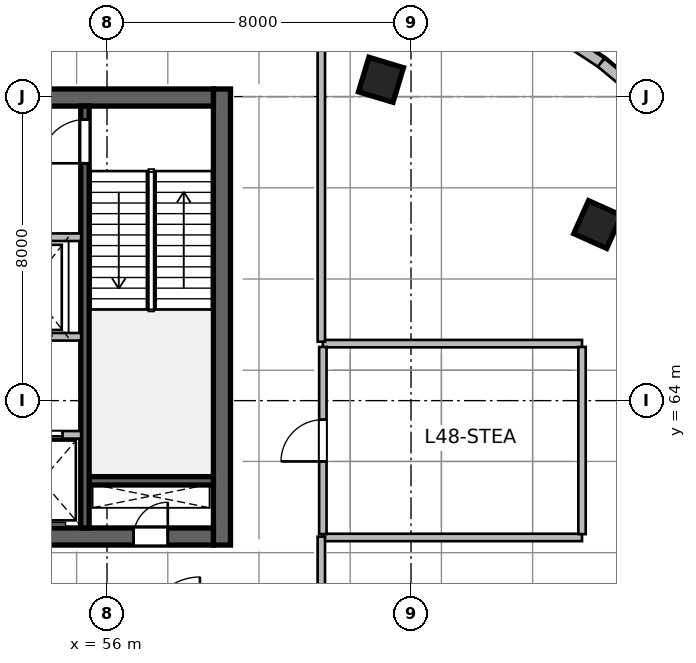
"""IFC4 building model, lengths in metres.
Left out: names, types, materials, properties, quantities, classifications, styles, units other than length and angle.
Written with IfcOpenShell. Run it as: python <this file> out.ifc"""

import sys

from ifc_helpers import new_model, si_unit, direction, frame, frame_2d, origin, origin_2d, place, context, subcontext, project, spatial, rectangle, extrude, source, transform, mapped, element, fill, save


model = new_model("IFC4")
c1 = context("Model", 3, precision=1e-05, world=origin(), true_north=direction((0.0, 1.0)))
c2 = subcontext(c1, "Body", "Model", "MODEL_VIEW")
j1 = project(units=[si_unit("LENGTHUNIT", "METRE"), si_unit("PLANEANGLEUNIT", "RADIAN")], contexts=[c1])
p1 = place(None, origin())
s1 = spatial("IfcSite", under=j1, at=p1, CompositionType="ELEMENT")
p2 = place(p1, origin())
s2 = spatial("IfcBuilding", under=s1, at=p2, CompositionType="ELEMENT")
p3 = place(p2, frame((0.0, 0.0, 199.2)))
s3 = spatial("IfcBuildingStorey", under=s2, at=p3, CompositionType="ELEMENT", Elevation=199.2)
m1 = source(origin(), c2, "Body", "SweptSolid", [
    extrude(rectangle(XDim=12.0, YDim=0.45, at=frame_2d((6.0, 0.0))), origin(), (0.0, 0.0, 1.0), 4.8),
])
p4 = place(p3, frame((59.025, 60.2, 0.0), z_axis=(0.0, 0.0, 1.0), x_axis=(0.0, 1.0, 0.0)))
e1 = element("IfcWall", 1, at=p4, inside=s3, PredefinedType="SHEAR", context=c2, shape_type="MappedRepresentation", body=[
    mapped(m1, transform((0.0, 0.0, 0.0), scale=1.0)),
])
m2 = source(origin(), c2, "Body", "SweptSolid", [
    extrude(rectangle(XDim=21.6, YDim=0.45, at=frame_2d((10.8, 0.0))), origin(), (0.0, 0.0, 1.0), 4.8),
])
p5 = place(p3, frame((37.2, 60.425, 0.0), z_axis=(0.0, 0.0, 1.0), x_axis=(1.0, 0.0, 0.0)))
e2 = element("IfcWall", 2, at=p5, inside=s3, PredefinedType="SHEAR", context=c2, shape_type="MappedRepresentation", body=[
    mapped(m2, transform((0.0, 0.0, 0.0), scale=1.0)),
])
p6 = place(p5, frame((1.1, 0.0, 0.0)))
e3 = element("IfcOpeningElement", 3, at=p6, cuts=e2, PredefinedType="OPENING", context=c2, shape_type="SweptSolid", body=[
    extrude(rectangle(XDim=1.15, YDim=2.15, at=frame_2d((0.575, 1.075))), frame((0.0, 0.235, 0.0), z_axis=(0.0, -1.0, 0.0), x_axis=(1.0, 0.0, 0.0)), (0.0, 0.0, 1.0), 0.47),
])
p7 = place(p5, frame((19.5, 0.0, 0.0)))
e4 = element("IfcOpeningElement", 4, at=p7, cuts=e2, PredefinedType="OPENING", context=c2, shape_type="SweptSolid", body=[
    extrude(rectangle(XDim=0.9, YDim=2.1, at=frame_2d((0.45, 1.05))), frame((0.0, 0.235, 0.0), z_axis=(0.0, -1.0, 0.0), x_axis=(1.0, 0.0, 0.0)), (0.0, 0.0, 1.0), 0.47),
])
p8 = place(p5, frame((12.02, 0.0, 0.0)))
e5 = element("IfcOpeningElement", 5, at=p8, cuts=e2, PredefinedType="OPENING", context=c2, shape_type="SweptSolid", body=[
    extrude(rectangle(XDim=1.6, YDim=2.15, at=frame_2d((0.8, 1.075))), frame((0.0, 0.235, 0.0), z_axis=(0.0, -1.0, 0.0), x_axis=(1.0, 0.0, 0.0)), (0.0, 0.0, 1.0), 0.47),
])
p9 = place(p3, frame((37.2, 71.975, 0.0), z_axis=(0.0, 0.0, 1.0), x_axis=(1.0, 0.0, 0.0)))
e6 = element("IfcWall", 6, at=p9, inside=s3, PredefinedType="SHEAR", context=c2, shape_type="MappedRepresentation", body=[
    mapped(m2, transform((0.0, 0.0, 0.0), scale=1.0)),
])
p10 = place(p9, frame((1.2, 0.0, 0.0)))
e7 = element("IfcOpeningElement", 7, at=p10, cuts=e6, PredefinedType="OPENING", context=c2, shape_type="SweptSolid", body=[
    extrude(rectangle(XDim=0.9, YDim=2.1, at=frame_2d((0.45, 1.05))), frame((0.0, 0.235, 0.0), z_axis=(0.0, -1.0, 0.0), x_axis=(1.0, 0.0, 0.0)), (0.0, 0.0, 1.0), 0.47),
])
p11 = place(p9, frame((14.7, 0.0, 0.0)))
e8 = element("IfcOpeningElement", 8, at=p11, cuts=e6, PredefinedType="OPENING", context=c2, shape_type="SweptSolid", body=[
    extrude(rectangle(XDim=1.2, YDim=2.15, at=frame_2d((0.6, 1.075))), frame((0.0, 0.235, 0.0), z_axis=(0.0, -1.0, 0.0), x_axis=(1.0, 0.0, 0.0)), (0.0, 0.0, 1.0), 0.47),
])
p12 = place(p9, frame((4.15, 0.0, 0.0)))
e9 = element("IfcOpeningElement", 9, at=p12, cuts=e6, PredefinedType="OPENING", context=c2, shape_type="SweptSolid", body=[
    extrude(rectangle(XDim=1.3, YDim=2.15, at=frame_2d((0.65, 1.075))), frame((0.0, 0.235, 0.0), z_axis=(0.0, -1.0, 0.0), x_axis=(1.0, 0.0, 0.0)), (0.0, 0.0, 1.0), 0.47),
])
p13 = place(p9, frame((7.25, 0.0, 0.0)))
e10 = element("IfcOpeningElement", 10, at=p13, cuts=e6, PredefinedType="OPENING", context=c2, shape_type="SweptSolid", body=[
    extrude(rectangle(XDim=0.9, YDim=2.1, at=frame_2d((0.45, 1.05))), frame((0.0, 0.235, 0.0), z_axis=(0.0, -1.0, 0.0), x_axis=(1.0, 0.0, 0.0)), (0.0, 0.0, 1.0), 0.47),
])
p14 = place(p9, frame((10.95, 0.0, 0.0)))
e11 = element("IfcOpeningElement", 11, at=p14, cuts=e6, PredefinedType="OPENING", context=c2, shape_type="SweptSolid", body=[
    extrude(rectangle(XDim=0.9, YDim=2.1, at=frame_2d((0.45, 1.05))), frame((0.0, 0.235, 0.0), z_axis=(0.0, -1.0, 0.0), x_axis=(1.0, 0.0, 0.0)), (0.0, 0.0, 1.0), 0.47),
])
m3 = source(origin(), c2, "Body", "SweptSolid", [
    extrude(rectangle(XDim=3.27, YDim=0.22, at=frame_2d((1.635, 0.0))), origin(), (0.0, 0.0, 1.0), 4.8),
])
p15 = place(p3, frame((55.53, 61.89, 0.0), z_axis=(0.0, 0.0, 1.0), x_axis=(1.0, 0.0, 0.0)))
e12 = element("IfcWall", 12, at=p15, inside=s3, PredefinedType="SHEAR", context=c2, shape_type="MappedRepresentation", body=[
    mapped(m3, transform((0.0, 0.0, 0.0), scale=1.0)),
])
m4 = source(origin(), c2, "Body", "SweptSolid", [
    extrude(rectangle(XDim=11.1, YDim=0.22, at=frame_2d((5.55, 0.0))), origin(), (0.0, 0.0, 1.0), 4.8),
])
p16 = place(p3, frame((55.42, 60.65, 0.0), z_axis=(0.0, 0.0, 1.0), x_axis=(0.0, 1.0, 0.0)))
e13 = element("IfcWall", 13, at=p16, inside=s3, PredefinedType="SHEAR", context=c2, shape_type="MappedRepresentation", body=[
    mapped(m4, transform((0.0, 0.0, 0.0), scale=1.0)),
])
p17 = place(p16, frame((9.595, 0.0, 0.0)))
e14 = element("IfcOpeningElement", 14, at=p17, cuts=e13, PredefinedType="OPENING", context=c2, shape_type="SweptSolid", body=[
    extrude(rectangle(XDim=1.15, YDim=2.15, at=frame_2d((0.575, 1.075))), frame((0.0, 0.12, 0.0), z_axis=(0.0, -1.0, 0.0), x_axis=(1.0, 0.0, 0.0)), (0.0, 0.0, 1.0), 0.24),
])
m5 = source(origin(), c2, "Body", "SweptSolid", [
    extrude(rectangle(XDim=0.95, YDim=0.95, at=origin_2d()), origin(), (0.0, 0.0, 1.0), 4.8),
])
for number, where, z_axis, x_axis in (
    (15, (63.209, 72.442, 0.0), (0.0, 0.0, 1.0), (0.289, 0.957, 0.0)),
    (16, (68.91, 68.633, 0.0), (0.0, 0.0, 1.0), (0.409, 0.912, 0.0)),
):
    element("IfcColumn", number, at=place(p3, frame(where, z_axis=z_axis, x_axis=x_axis)), inside=s3, PredefinedType="COLUMN", context=c2, shape_type="MappedRepresentation", body=[
        mapped(m5, transform((0.0, 0.0, 0.0), scale=1.0)),
    ])
m6 = source(origin(), c2, "Body", "SweptSolid", [
    extrude(rectangle(XDim=4.713, YDim=0.28, at=frame_2d((2.356, 0.0))), origin(), (0.0, 0.0, 1.0), 4.54),
])
p18 = place(p3, frame((65.066, 75.482, 0.0), z_axis=(0.0, 0.0, 1.0), x_axis=(0.835974386457, -0.548768462275, 0.0)))
e17 = element("IfcWall", 17, at=p18, inside=s3, PredefinedType="SOLIDWALL", context=c2, shape_type="MappedRepresentation", body=[
    mapped(m6, transform((0.0, 0.0, 0.0), scale=1.0)),
])
m7 = source(origin(), c2, "Body", "SweptSolid", [
    extrude(rectangle(XDim=4.852, YDim=0.28, at=frame_2d((2.426, 0.0))), origin(), (0.0, 0.0, 1.0), 4.54),
])
p19 = place(p3, frame((69.006, 72.896, 0.0), z_axis=(0.0, 0.0, 1.0), x_axis=(0.767936605821, -0.640525853843, 0.0)))
e18 = element("IfcWall", 18, at=p19, inside=s3, PredefinedType="SOLIDWALL", context=c2, shape_type="MappedRepresentation", body=[
    mapped(m7, transform((0.0, 0.0, 0.0), scale=1.0)),
])
m8 = source(origin(), c2, "Body", "SweptSolid", [
    extrude(rectangle(XDim=5.62, YDim=0.2, at=frame_2d((2.81, 0.0))), origin(), (0.0, 0.0, 1.0), 4.54),
])
p20 = place(p3, frame((49.7, 68.3, 0.0), z_axis=(0.0, 0.0, 1.0), x_axis=(1.0, 0.0, 0.0)))
e19 = element("IfcWall", 19, at=p20, inside=s3, PredefinedType="SOLIDWALL", context=c2, shape_type="MappedRepresentation", body=[
    mapped(m8, transform((0.0, 0.0, 0.0), scale=1.0)),
])
p21 = place(p20, frame((1.6, 0.0, 0.0)))
e20 = element("IfcOpeningElement", 20, at=p21, cuts=e19, PredefinedType="OPENING", context=c2, shape_type="SweptSolid", body=[
    extrude(rectangle(XDim=1.1, YDim=2.15, at=frame_2d((0.55, 1.075))), frame((0.0, 0.11, 0.0), z_axis=(0.0, -1.0, 0.0), x_axis=(1.0, 0.0, 0.0)), (0.0, 0.0, 1.0), 0.22),
])
p22 = place(p20, frame((3.7, 0.0, 0.0)))
e21 = element("IfcOpeningElement", 21, at=p22, cuts=e19, PredefinedType="OPENING", context=c2, shape_type="SweptSolid", body=[
    extrude(rectangle(XDim=1.1, YDim=2.15, at=frame_2d((0.55, 1.075))), frame((0.0, 0.11, 0.0), z_axis=(0.0, -1.0, 0.0), x_axis=(1.0, 0.0, 0.0)), (0.0, 0.0, 1.0), 0.22),
])
p23 = place(p3, frame((49.7, 65.68, 0.0), z_axis=(0.0, 0.0, 1.0), x_axis=(1.0, 0.0, 0.0)))
e22 = element("IfcWall", 22, at=p23, inside=s3, PredefinedType="SOLIDWALL", context=c2, shape_type="MappedRepresentation", body=[
    mapped(m8, transform((0.0, 0.0, 0.0), scale=1.0)),
])
m9 = source(origin(), c2, "Body", "SweptSolid", [
    extrude(rectangle(XDim=4.1, YDim=0.2, at=frame_2d((2.05, 0.0))), origin(), (0.0, 0.0, 1.0), 4.54),
])
p24 = place(p3, frame((51.22, 63.1, 0.0), z_axis=(0.0, 0.0, 1.0), x_axis=(1.0, 0.0, 0.0)))
e23 = element("IfcWall", 23, at=p24, inside=s3, PredefinedType="SOLIDWALL", context=c2, shape_type="MappedRepresentation", body=[
    mapped(m9, transform((0.0, 0.0, 0.0), scale=1.0)),
])
p25 = place(p24, frame((0.51, 0.0, 0.0)))
e24 = element("IfcOpeningElement", 24, at=p25, cuts=e23, PredefinedType="OPENING", context=c2, shape_type="SweptSolid", body=[
    extrude(rectangle(XDim=1.1, YDim=2.15, at=frame_2d((0.55, 1.075))), frame((0.0, 0.11, 0.0), z_axis=(0.0, -1.0, 0.0), x_axis=(1.0, 0.0, 0.0)), (0.0, 0.0, 1.0), 0.22),
])
p26 = place(p24, frame((2.51, 0.0, 0.0)))
e25 = element("IfcOpeningElement", 25, at=p26, cuts=e23, PredefinedType="OPENING", context=c2, shape_type="SweptSolid", body=[
    extrude(rectangle(XDim=1.1, YDim=2.15, at=frame_2d((0.55, 1.075))), frame((0.0, 0.11, 0.0), z_axis=(0.0, -1.0, 0.0), x_axis=(1.0, 0.0, 0.0)), (0.0, 0.0, 1.0), 0.22),
])
m10 = source(origin(), c2, "Body", "SweptSolid", [
    extrude(rectangle(XDim=6.82, YDim=0.195, at=frame_2d((3.41, 0.0))), origin(), (0.0, 0.0, 1.0), 4.54),
])
for number, where, z_axis, x_axis in (
    (26, (61.68, 60.4, 0.0), (0.0, 0.0, 1.0), (1.0, 0.0, 0.0)),
    (27, (61.68, 65.5, 0.0), (0.0, 0.0, 1.0), (1.0, 0.0, 0.0)),
):
    element("IfcWall", number, at=place(p3, frame(where, z_axis=z_axis, x_axis=x_axis)), inside=s3, PredefinedType="PARTITIONING", context=c2, shape_type="MappedRepresentation", body=[
        mapped(m10, transform((0.0, 0.0, 0.0), scale=1.0)),
    ])
m11 = source(origin(), c2, "Body", "SweptSolid", [
    extrude(rectangle(XDim=4.925, YDim=0.195, at=frame_2d((2.462, 0.0))), origin(), (0.0, 0.0, 1.0), 4.54),
])
p27 = place(p3, frame((61.68, 60.488, 0.0), z_axis=(0.0, 0.0, 1.0), x_axis=(0.0, 1.0, 0.0)))
e28 = element("IfcWall", 28, at=p27, inside=s3, PredefinedType="PARTITIONING", context=c2, shape_type="MappedRepresentation", body=[
    mapped(m11, transform((0.0, 0.0, 0.0), scale=1.0)),
])
p28 = place(p27, frame((1.912, 0.0, 0.0)))
e29 = element("IfcOpeningElement", 29, at=p28, cuts=e28, PredefinedType="OPENING", context=c2, shape_type="SweptSolid", body=[
    extrude(rectangle(XDim=1.1, YDim=2.15, at=frame_2d((0.55, 1.075))), frame((0.0, 0.107, 0.0), z_axis=(0.0, -1.0, 0.0), x_axis=(1.0, 0.0, 0.0)), (0.0, 0.0, 1.0), 0.215),
])
p29 = place(p3, frame((68.5, 60.488, 0.0), z_axis=(0.0, 0.0, 1.0), x_axis=(0.0, 1.0, 0.0)))
e30 = element("IfcWall", 30, at=p29, inside=s3, PredefinedType="PARTITIONING", context=c2, shape_type="MappedRepresentation", body=[
    mapped(m11, transform((0.0, 0.0, 0.0), scale=1.0)),
])
m12 = source(origin(), c2, "Body", "SweptSolid", [
    extrude(rectangle(XDim=2.46, YDim=0.195, at=frame_2d((1.23, 0.0))), origin(), (0.0, 0.0, 1.0), 4.54),
])
p30 = place(p3, frame((61.64, 57.96, 0.0), z_axis=(0.0, 0.0, 1.0), x_axis=(0.0, 1.0, 0.0)))
e31 = element("IfcWall", 31, at=p30, inside=s3, PredefinedType="PARTITIONING", context=c2, shape_type="MappedRepresentation", body=[
    mapped(m12, transform((0.0, 0.0, 0.0), scale=1.0)),
])
m13 = source(origin(), c2, "Body", "SweptSolid", [
    extrude(rectangle(XDim=11.619, YDim=0.195, at=frame_2d((5.809, 0.0))), origin(), (0.0, 0.0, 1.0), 4.54),
])
p31 = place(p3, frame((61.64, 65.55, 0.0), z_axis=(0.0, 0.0, 1.0), x_axis=(0.0, 1.0, 0.0)))
e32 = element("IfcWall", 32, at=p31, inside=s3, PredefinedType="PARTITIONING", context=c2, shape_type="MappedRepresentation", body=[
    mapped(m13, transform((0.0, 0.0, 0.0), scale=1.0)),
])
m14 = source(origin(), c2, "Body", "SweptSolid", [
    extrude(rectangle(XDim=0.9, YDim=2.1, at=frame_2d((0.45, 1.05))), frame((0.0, 0.025, 0.0), z_axis=(0.0, -1.0, 0.0), x_axis=(1.0, 0.0, 0.0)), (0.0, 0.0, 1.0), 0.05),
])
p32 = place(p7, origin())
e33 = element("IfcDoor", 33, at=p32, inside=s3, OperationType="SINGLE_SWING_RIGHT", PredefinedType="DOOR", context=c2, shape_type="MappedRepresentation", body=[
    mapped(m14, transform((0.0, 0.0, 0.0), scale=1.0)),
])
fill(e4, e33)
m15 = source(origin(), c2, "Body", "SweptSolid", [
    extrude(rectangle(XDim=1.15, YDim=2.15, at=frame_2d((0.575, 1.075))), frame((0.0, 0.025, 0.0), z_axis=(0.0, -1.0, 0.0), x_axis=(1.0, 0.0, 0.0)), (0.0, 0.0, 1.0), 0.05),
])
p33 = place(p17, origin())
e34 = element("IfcDoor", 34, at=p33, inside=s3, OperationType="SINGLE_SWING_LEFT", PredefinedType="DOOR", context=c2, shape_type="MappedRepresentation", body=[
    mapped(m15, transform((0.0, 0.0, 0.0), scale=1.0)),
])
fill(e14, e34)
m16 = source(origin(), c2, "Body", "SweptSolid", [
    extrude(rectangle(XDim=1.1, YDim=2.15, at=frame_2d((0.55, 1.075))), frame((0.0, 0.025, 0.0), z_axis=(0.0, -1.0, 0.0), x_axis=(1.0, 0.0, 0.0)), (0.0, 0.0, 1.0), 0.05),
])
p34 = place(p26, origin())
e35 = element("IfcDoor", 35, at=p34, inside=s3, OperationType="DOUBLE_DOOR_SLIDING", PredefinedType="DOOR", context=c2, shape_type="MappedRepresentation", body=[
    mapped(m16, transform((0.0, 0.0, 0.0), scale=1.0)),
])
fill(e25, e35)
m17 = source(origin(), c2, "Body", "SweptSolid", [
    extrude(rectangle(XDim=1.1, YDim=2.15, at=frame_2d((0.55, 1.075))), frame((0.0, 0.025, 0.0), z_axis=(0.0, -1.0, 0.0), x_axis=(1.0, 0.0, 0.0)), (0.0, 0.0, 1.0), 0.05),
])
p35 = place(p28, origin())
e36 = element("IfcDoor", 36, at=p35, inside=s3, OperationType="SINGLE_SWING_LEFT", PredefinedType="DOOR", context=c2, shape_type="MappedRepresentation", body=[
    mapped(m17, transform((0.0, 0.0, 0.0), scale=1.0)),
])
fill(e29, e36)
save(model, sys.argv[1])
